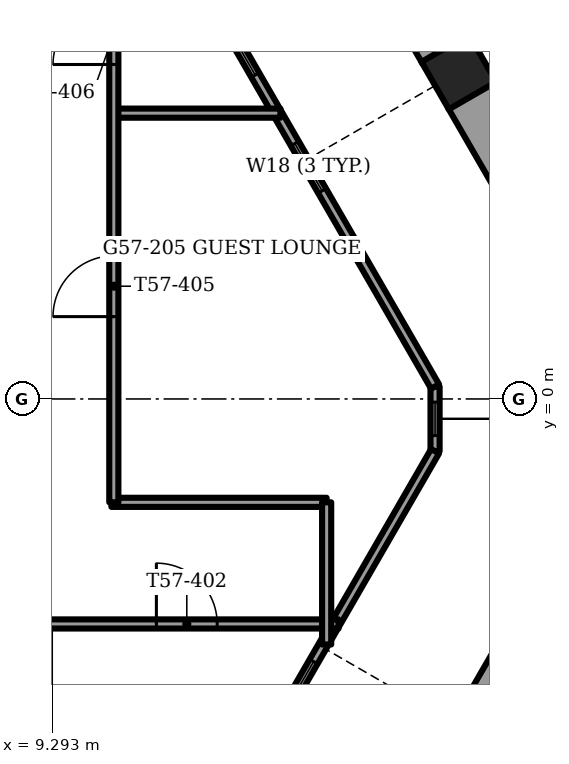
"""IFC4 building model, lengths in metres.
Left out: names, types, materials, properties, quantities, classifications, styles, units other than length and angle.
Written with IfcOpenShell. Run it as: python <this file> out.ifc"""

import sys

from ifc_helpers import new_model, si_unit, direction, frame, frame_2d, origin, origin_2d, place, context, subcontext, project, spatial, rectangle, extrude, element, fill, save


model = new_model("IFC4")
c1 = context("Model", 3, precision=1e-05, world=origin(), true_north=direction((0.0, 1.0)))
c2 = subcontext(c1, "Body", "Model", "MODEL_VIEW")
j1 = project(units=[si_unit("LENGTHUNIT", "METRE"), si_unit("PLANEANGLEUNIT", "RADIAN")], contexts=[c1])
p1 = place(None, origin())
s1 = spatial("IfcSite", under=j1, at=p1, CompositionType="ELEMENT")
p2 = place(p1, origin())
s2 = spatial("IfcBuilding", under=s1, at=p2, CompositionType="ELEMENT")
p3 = place(p2, frame((0.0, 0.0, 229.5)))
s3 = spatial("IfcBuildingStorey", under=s2, at=p3, CompositionType="ELEMENT", Elevation=229.5)
p4 = place(p3, frame((15.974, 5.378, -1.2), z_axis=(0.0, 0.0, 1.0), x_axis=(0.5, -0.866025403784, 0.0)))
e1 = element("IfcColumn", 1, at=p4, inside=s3, PredefinedType="COLUMN", context=c2, shape_type="SweptSolid", body=[
    extrude(rectangle(XDim=0.9, YDim=0.9, at=origin_2d()), origin(), (0.0, 0.0, 1.0), 3.75),
])
p5 = place(p3, frame((16.467, -5.178, 0.0), z_axis=(0.0, 0.0, 1.0), x_axis=(0.499995206172, 0.866028171485, 0.0)))
e2 = element("IfcWall", 2, at=p5, inside=s3, PredefinedType="PARAPET", context=c2, shape_type="SweptSolid", body=[
    extrude(rectangle(XDim=5.114, YDim=0.9, at=frame_2d((2.557, 0.0))), origin(), (0.0, 0.0, 1.0), 1.1),
])
p6 = place(p3, frame((19.024, 0.095, 0.0), z_axis=(0.0, 0.0, 1.0), x_axis=(-0.499994028088, 0.866028851642, 0.0)))
e3 = element("IfcWall", 3, at=p6, inside=s3, PredefinedType="PARAPET", context=c2, shape_type="SweptSolid", body=[
    extrude(rectangle(XDim=5.681, YDim=0.9, at=frame_2d((2.84, 0.0))), origin(), (0.0, 0.0, 1.0), 1.1),
])
p7 = place(p3, frame((15.764, 5.742, 0.0), z_axis=(0.0, 0.0, 1.0), x_axis=(-0.499997265274, 0.866026982673, 0.0)))
e4 = element("IfcWall", 4, at=p7, inside=s3, PredefinedType="PARAPET", context=c2, shape_type="SweptSolid", body=[
    extrude(rectangle(XDim=5.819, YDim=0.9, at=frame_2d((2.909, 0.0))), origin(), (0.0, 0.0, 1.0), 1.1),
])
p8 = place(p3, frame((10.479, -9.7, 0.0), z_axis=(0.0, 0.0, 1.0), x_axis=(0.499995050918, 0.866028261119, 0.0)))
e5 = element("IfcWall", 5, at=p8, inside=s3, PredefinedType="SOLIDWALL", context=c2, shape_type="SweptSolid", body=[
    extrude(rectangle(XDim=10.208, YDim=0.15, at=frame_2d((5.104, 0.0))), origin(), (0.0, 0.0, 1.0), 3.45),
])
p9 = place(p8, frame((3.461, 0.0, 0.15)))
e6 = element("IfcOpeningElement", 6, at=p9, cuts=e5, PredefinedType="OPENING", context=c2, shape_type="SweptSolid", body=[
    extrude(rectangle(XDim=0.9, YDim=2.2, at=frame_2d((0.45, 1.1))), frame((0.0, 0.075, 0.0), z_axis=(0.0, -1.0, 0.0), x_axis=(1.0, 0.0, 0.0)), (0.0, 0.0, 1.0), 0.15),
])
p10 = place(p8, frame((4.814, 0.0, 0.15)))
e7 = element("IfcOpeningElement", 7, at=p10, cuts=e5, PredefinedType="OPENING", context=c2, shape_type="SweptSolid", body=[
    extrude(rectangle(XDim=1.4, YDim=2.2, at=frame_2d((0.7, 1.1))), frame((0.0, 0.075, 0.0), z_axis=(0.0, -1.0, 0.0), x_axis=(1.0, 0.0, 0.0)), (0.0, 0.0, 1.0), 0.15),
])
p11 = place(p3, frame((15.583, 0.205, 0.0), z_axis=(0.0, 0.0, 1.0), x_axis=(-0.49998469459, 0.866034240187, 0.0)))
e8 = element("IfcWall", 8, at=p11, inside=s3, PredefinedType="SOLIDWALL", context=c2, shape_type="SweptSolid", body=[
    extrude(rectangle(XDim=10.208, YDim=0.15, at=frame_2d((5.104, 0.0))), origin(), (0.0, 0.0, 1.0), 3.45),
])
p12 = place(p11, frame((3.714, 0.0, 0.15)))
e9 = element("IfcOpeningElement", 9, at=p12, cuts=e8, PredefinedType="OPENING", context=c2, shape_type="SweptSolid", body=[
    extrude(rectangle(XDim=0.9, YDim=2.2, at=frame_2d((0.45, 1.1))), frame((0.0, 0.075, 0.0), z_axis=(0.0, -1.0, 0.0), x_axis=(1.0, 0.0, 0.0)), (0.0, 0.0, 1.0), 0.15),
])
p13 = place(p11, frame((5.914, 0.0, 0.15)))
e10 = element("IfcOpeningElement", 10, at=p13, cuts=e8, PredefinedType="OPENING", context=c2, shape_type="SweptSolid", body=[
    extrude(rectangle(XDim=1.4, YDim=2.2, at=frame_2d((0.7, 1.1))), frame((0.0, 0.075, 0.0), z_axis=(0.0, -1.0, 0.0), x_axis=(1.0, 0.0, 0.0)), (0.0, 0.0, 1.0), 0.15),
])
p14 = place(p3, frame((15.583, -0.86, 0.0), z_axis=(0.0, 0.0, 1.0), x_axis=(0.0, 1.0, 0.0)))
e11 = element("IfcWall", 11, at=p14, inside=s3, PredefinedType="SOLIDWALL", context=c2, shape_type="SweptSolid", body=[
    extrude(rectangle(XDim=1.065, YDim=0.15, at=frame_2d((0.532, 0.0))), origin(), (0.0, 0.0, 1.0), 3.45),
])
p15 = place(p14, frame((0.258, 0.0, 0.15)))
e12 = element("IfcOpeningElement", 12, at=p15, cuts=e11, PredefinedType="OPENING", context=c2, shape_type="SweptSolid", body=[
    extrude(rectangle(XDim=0.55, YDim=2.2, at=frame_2d((0.275, 1.1))), frame((0.0, 0.075, 0.0), z_axis=(0.0, -1.0, 0.0), x_axis=(1.0, 0.0, 0.0)), (0.0, 0.0, 1.0), 0.15),
])
p16 = place(p3, frame((9.16, -3.7, 0.0), z_axis=(0.0, 0.0, 1.0), x_axis=(1.0, 0.0, 0.0)))
e13 = element("IfcWall", 13, at=p16, inside=s3, PredefinedType="PARTITIONING", context=c2, shape_type="SweptSolid", body=[
    extrude(rectangle(XDim=4.835, YDim=0.15, at=frame_2d((2.417, 0.0))), origin(), (0.0, 0.0, 1.0), 3.45),
])
p17 = place(p16, frame((1.84, 0.0, 0.0)))
e14 = element("IfcOpeningElement", 14, at=p17, cuts=e13, PredefinedType="OPENING", context=c2, shape_type="SweptSolid", body=[
    extrude(rectangle(XDim=1.0, YDim=2.1, at=frame_2d((0.5, 1.05))), frame((0.0, 0.075, 0.0), z_axis=(0.0, -1.0, 0.0), x_axis=(1.0, 0.0, 0.0)), (0.0, 0.0, 1.0), 0.15),
])
p18 = place(p3, frame((10.26, -1.7, 0.0), z_axis=(0.0, 0.0, 1.0), x_axis=(1.0, 0.0, 0.0)))
e15 = element("IfcWall", 15, at=p18, inside=s3, PredefinedType="PARTITIONING", context=c2, shape_type="SweptSolid", body=[
    extrude(rectangle(XDim=3.54, YDim=0.15, at=frame_2d((1.77, 0.0))), origin(), (0.0, 0.0, 1.0), 3.45),
])
p19 = place(p3, frame((10.3, 4.7, 0.0), z_axis=(0.0, 0.0, 1.0), x_axis=(1.0, 0.0, 0.0)))
e16 = element("IfcWall", 16, at=p19, inside=s3, PredefinedType="PARTITIONING", context=c2, shape_type="SweptSolid", body=[
    extrude(rectangle(XDim=2.74, YDim=0.15, at=frame_2d((1.37, 0.0))), origin(), (0.0, 0.0, 1.0), 3.45),
])
p20 = place(p3, frame((13.8, -4.038, 0.0), z_axis=(0.0, 0.0, 1.0), x_axis=(0.0, 1.0, 0.0)))
e17 = element("IfcWall", 17, at=p20, inside=s3, PredefinedType="PARTITIONING", context=c2, shape_type="SweptSolid", body=[
    extrude(rectangle(XDim=2.338, YDim=0.15, at=frame_2d((1.169, 0.0))), origin(), (0.0, 0.0, 1.0), 3.45),
])
p21 = place(p3, frame((10.3, -1.7, 0.0), z_axis=(0.0, 0.0, 1.0), x_axis=(0.0, 1.0, 0.0)))
e18 = element("IfcWall", 18, at=p21, inside=s3, PredefinedType="PARTITIONING", context=c2, shape_type="SweptSolid", body=[
    extrude(rectangle(XDim=9.0, YDim=0.15, at=frame_2d((4.5, 0.0))), origin(), (0.0, 0.0, 1.0), 3.45),
])
p22 = place(p21, frame((3.054, 0.0, 0.0)))
e19 = element("IfcOpeningElement", 19, at=p22, cuts=e18, PredefinedType="OPENING", context=c2, shape_type="SweptSolid", body=[
    extrude(rectangle(XDim=1.0, YDim=2.1, at=frame_2d((0.5, 1.05))), frame((0.0, 0.075, 0.0), z_axis=(0.0, -1.0, 0.0), x_axis=(1.0, 0.0, 0.0)), (0.0, 0.0, 1.0), 0.15),
])
p23 = place(p21, frame((7.2, 0.0, 0.0)))
e20 = element("IfcOpeningElement", 20, at=p23, cuts=e18, PredefinedType="OPENING", context=c2, shape_type="SweptSolid", body=[
    extrude(rectangle(XDim=1.0, YDim=2.1, at=frame_2d((0.5, 1.05))), frame((0.0, 0.075, 0.0), z_axis=(0.0, -1.0, 0.0), x_axis=(1.0, 0.0, 0.0)), (0.0, 0.0, 1.0), 0.15),
])
p24 = place(p10, origin())
e21 = element("IfcWindow", 21, at=p24, inside=s3, PartitioningType="SINGLE_PANEL", PredefinedType="WINDOW", context=c2, shape_type="SweptSolid", body=[
    extrude(rectangle(XDim=1.4, YDim=2.2, at=frame_2d((0.7, 1.1))), frame((0.0, 0.03, 0.0), z_axis=(0.0, -1.0, 0.0), x_axis=(1.0, 0.0, 0.0)), (0.0, 0.0, 1.0), 0.06),
])
fill(e7, e21)
p25 = place(p12, origin())
e22 = element("IfcWindow", 22, at=p25, inside=s3, PartitioningType="SINGLE_PANEL", PredefinedType="WINDOW", context=c2, shape_type="SweptSolid", body=[
    extrude(rectangle(XDim=0.9, YDim=2.2, at=frame_2d((0.45, 1.1))), frame((0.0, 0.03, 0.0), z_axis=(0.0, -1.0, 0.0), x_axis=(1.0, 0.0, 0.0)), (0.0, 0.0, 1.0), 0.06),
])
fill(e9, e22)
p26 = place(p13, origin())
e23 = element("IfcWindow", 23, at=p26, inside=s3, PartitioningType="SINGLE_PANEL", PredefinedType="WINDOW", context=c2, shape_type="SweptSolid", body=[
    extrude(rectangle(XDim=1.4, YDim=2.2, at=frame_2d((0.7, 1.1))), frame((0.0, 0.03, 0.0), z_axis=(0.0, -1.0, 0.0), x_axis=(1.0, 0.0, 0.0)), (0.0, 0.0, 1.0), 0.06),
])
fill(e10, e23)
p27 = place(p15, origin())
e24 = element("IfcWindow", 24, at=p27, inside=s3, PartitioningType="SINGLE_PANEL", PredefinedType="WINDOW", context=c2, shape_type="SweptSolid", body=[
    extrude(rectangle(XDim=0.55, YDim=2.2, at=frame_2d((0.275, 1.1))), frame((0.0, 0.03, 0.0), z_axis=(0.0, -1.0, 0.0), x_axis=(1.0, 0.0, 0.0)), (0.0, 0.0, 1.0), 0.06),
])
fill(e12, e24)
p28 = place(p17, origin())
e25 = element("IfcDoor", 25, at=p28, inside=s3, OperationType="SINGLE_SWING_LEFT", PredefinedType="DOOR", context=c2, shape_type="SweptSolid", body=[
    extrude(rectangle(XDim=1.0, YDim=2.1, at=frame_2d((0.5, 1.05))), frame((0.0, 0.025, 0.0), z_axis=(0.0, -1.0, 0.0), x_axis=(1.0, 0.0, 0.0)), (0.0, 0.0, 1.0), 0.05),
])
fill(e14, e25)
p29 = place(p22, origin())
e26 = element("IfcDoor", 26, at=p29, inside=s3, OperationType="SINGLE_SWING_RIGHT", PredefinedType="DOOR", context=c2, shape_type="SweptSolid", body=[
    extrude(rectangle(XDim=1.0, YDim=2.1, at=frame_2d((0.5, 1.05))), frame((0.0, 0.025, 0.0), z_axis=(0.0, -1.0, 0.0), x_axis=(1.0, 0.0, 0.0)), (0.0, 0.0, 1.0), 0.05),
])
fill(e19, e26)
p30 = place(p23, origin())
e27 = element("IfcDoor", 27, at=p30, inside=s3, OperationType="SINGLE_SWING_LEFT", PredefinedType="DOOR", context=c2, shape_type="SweptSolid", body=[
    extrude(rectangle(XDim=1.0, YDim=2.1, at=frame_2d((0.5, 1.05))), frame((0.0, 0.025, 0.0), z_axis=(0.0, -1.0, 0.0), x_axis=(1.0, 0.0, 0.0)), (0.0, 0.0, 1.0), 0.05),
])
fill(e20, e27)
save(model, sys.argv[1])
